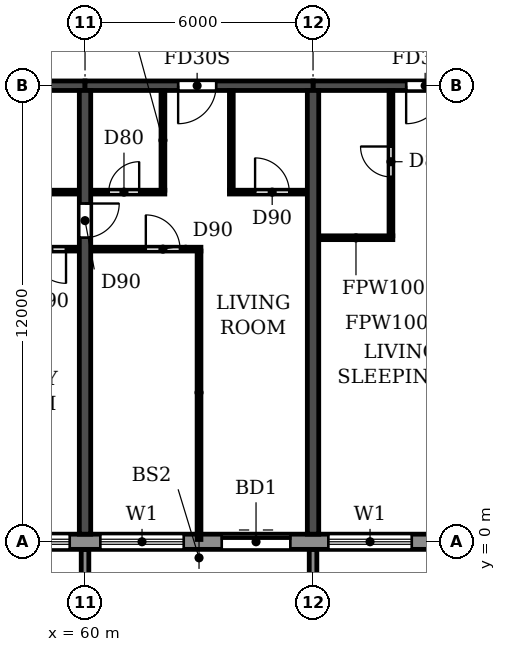
"""IFC4 building model, lengths in metres.
Left out: names, types, materials, properties, quantities, classifications, styles, units other than length and angle.
Written with IfcOpenShell. Run it as: python <this file> out.ifc"""

import sys

from ifc_helpers import new_model, si_unit, direction, frame, frame_2d, origin, place, context, subcontext, project, spatial, polyline, rectangle, outline, extrude, source, transform, mapped, element, fill, save


model = new_model("IFC4")
c1 = context("Model", 3, precision=1e-05, world=origin(), true_north=direction((0.0, 1.0)))
c2 = subcontext(c1, "Body", "Model", "MODEL_VIEW")
j1 = project(units=[si_unit("LENGTHUNIT", "METRE"), si_unit("PLANEANGLEUNIT", "RADIAN")], contexts=[c1])
p1 = place(None, origin())
s1 = spatial("IfcSite", under=j1, at=p1, CompositionType="ELEMENT")
p2 = place(p1, origin())
s2 = spatial("IfcBuilding", under=s1, at=p2, CompositionType="ELEMENT")
p3 = place(p2, frame((0.0, 0.0, 155.4)))
s3 = spatial("IfcBuildingStorey", under=s2, at=p3, CompositionType="ELEMENT", Elevation=155.4)
p4 = place(p3, frame((60.0, 0.2, 0.0), z_axis=(0.0, 0.0, 1.0), x_axis=(0.0, 1.0, 0.0)))
e1 = element("IfcWall", 1, at=p4, inside=s3, PredefinedType="SHEAR", context=c2, shape_type="SweptSolid", body=[
    extrude(rectangle(XDim=11.675, YDim=0.3, at=frame_2d((5.837, 0.0))), origin(), (0.0, 0.0, 1.0), 3.0),
])
p5 = place(p4, frame((7.8, 0.0, 0.0)))
e2 = element("IfcOpeningElement", 2, at=p5, cuts=e1, PredefinedType="OPENING", context=c2, shape_type="SweptSolid", body=[
    extrude(rectangle(XDim=0.9, YDim=2.1, at=frame_2d((0.45, 1.05))), frame((0.0, 0.16, 0.0), z_axis=(0.0, -1.0, 0.0), x_axis=(1.0, 0.0, 0.0)), (0.0, 0.0, 1.0), 0.32),
])
p6 = place(p3, frame((66.0, 0.2, 0.0), z_axis=(0.0, 0.0, 1.0), x_axis=(0.0, 1.0, 0.0)))
e3 = element("IfcWall", 3, at=p6, inside=s3, PredefinedType="SHEAR", context=c2, shape_type="SweptSolid", body=[
    extrude(rectangle(XDim=11.675, YDim=0.3, at=frame_2d((5.837, 0.0))), origin(), (0.0, 0.0, 1.0), 3.0),
])
p7 = place(p3, frame((54.0, 12.0, 0.0), z_axis=(0.0, 0.0, 1.0), x_axis=(1.0, 0.0, 0.0)))
e4 = element("IfcWall", 4, at=p7, inside=s3, PredefinedType="SHEAR", context=c2, shape_type="SweptSolid", body=[
    extrude(rectangle(XDim=6.0, YDim=0.25, at=frame_2d((3.0, 0.0))), origin(), (0.0, 0.0, 1.0), 2.4),
])
p8 = place(p3, frame((60.0, 12.0, 0.0), z_axis=(0.0, 0.0, 1.0), x_axis=(1.0, 0.0, 0.0)))
e5 = element("IfcWall", 5, at=p8, inside=s3, PredefinedType="SHEAR", context=c2, shape_type="SweptSolid", body=[
    extrude(rectangle(XDim=6.0, YDim=0.25, at=frame_2d((3.0, 0.0))), origin(), (0.0, 0.0, 1.0), 2.4),
])
p9 = place(p8, frame((2.45, 0.0, 0.0)))
e6 = element("IfcOpeningElement", 6, at=p9, cuts=e5, PredefinedType="OPENING", context=c2, shape_type="SweptSolid", body=[
    extrude(rectangle(XDim=1.0, YDim=2.1, at=frame_2d((0.5, 1.05))), frame((0.0, 0.135, 0.0), z_axis=(0.0, -1.0, 0.0), x_axis=(1.0, 0.0, 0.0)), (0.0, 0.0, 1.0), 0.27),
])
p10 = place(p3, frame((66.0, 12.0, 0.0), z_axis=(0.0, 0.0, 1.0), x_axis=(1.0, 0.0, 0.0)))
e7 = element("IfcWall", 7, at=p10, inside=s3, PredefinedType="SHEAR", context=c2, shape_type="SweptSolid", body=[
    extrude(rectangle(XDim=6.0, YDim=0.25, at=frame_2d((3.0, 0.0))), origin(), (0.0, 0.0, 1.0), 2.4),
])
p11 = place(p10, frame((2.45, 0.0, 0.0)))
e8 = element("IfcOpeningElement", 8, at=p11, cuts=e7, PredefinedType="OPENING", context=c2, shape_type="SweptSolid", body=[
    extrude(rectangle(XDim=1.0, YDim=2.1, at=frame_2d((0.5, 1.05))), frame((0.0, 0.135, 0.0), z_axis=(0.0, -1.0, 0.0), x_axis=(1.0, 0.0, 0.0)), (0.0, 0.0, 1.0), 0.27),
])
p12 = place(p3, frame((16.683, 0.0, 0.0), z_axis=(0.0, 0.0, 1.0), x_axis=(1.0, 0.0, 0.0)))
e9 = element("IfcWall", 9, at=p12, inside=s3, PredefinedType="STANDARD", context=c2, shape_type="SweptSolid", body=[
    extrude(rectangle(XDim=68.634, YDim=0.4, at=frame_2d((34.317, 0.0))), origin(), (0.0, 0.0, 1.0), 3.0),
])
p13 = place(p12, frame((1.717, 0.0, 0.9)))
e10 = element("IfcOpeningElement", 10, at=p13, cuts=e9, PredefinedType="OPENING", context=c2, shape_type="SweptSolid", body=[
    extrude(rectangle(XDim=2.2, YDim=1.5, at=frame_2d((1.1, 0.75))), frame((0.0, 0.21, 0.0), z_axis=(0.0, -1.0, 0.0), x_axis=(1.0, 0.0, 0.0)), (0.0, 0.0, 1.0), 0.42),
])
p14 = place(p12, frame((4.717, 0.0, 0.9)))
e11 = element("IfcOpeningElement", 11, at=p14, cuts=e9, PredefinedType="OPENING", context=c2, shape_type="SweptSolid", body=[
    extrude(rectangle(XDim=2.2, YDim=1.5, at=frame_2d((1.1, 0.75))), frame((0.0, 0.21, 0.0), z_axis=(0.0, -1.0, 0.0), x_axis=(1.0, 0.0, 0.0)), (0.0, 0.0, 1.0), 0.42),
])
p15 = place(p12, frame((7.917, 0.0, 0.0)))
e12 = element("IfcOpeningElement", 12, at=p15, cuts=e9, PredefinedType="OPENING", context=c2, shape_type="SweptSolid", body=[
    extrude(rectangle(XDim=1.8, YDim=2.4, at=frame_2d((0.9, 1.2))), frame((0.0, 0.21, 0.0), z_axis=(0.0, -1.0, 0.0), x_axis=(1.0, 0.0, 0.0)), (0.0, 0.0, 1.0), 0.42),
])
p16 = place(p12, frame((10.717, 0.0, 0.9)))
e13 = element("IfcOpeningElement", 13, at=p16, cuts=e9, PredefinedType="OPENING", context=c2, shape_type="SweptSolid", body=[
    extrude(rectangle(XDim=2.2, YDim=1.5, at=frame_2d((1.1, 0.75))), frame((0.0, 0.21, 0.0), z_axis=(0.0, -1.0, 0.0), x_axis=(1.0, 0.0, 0.0)), (0.0, 0.0, 1.0), 0.42),
])
p17 = place(p12, frame((13.717, 0.0, 0.9)))
e14 = element("IfcOpeningElement", 14, at=p17, cuts=e9, PredefinedType="OPENING", context=c2, shape_type="SweptSolid", body=[
    extrude(rectangle(XDim=2.2, YDim=1.5, at=frame_2d((1.1, 0.75))), frame((0.0, 0.21, 0.0), z_axis=(0.0, -1.0, 0.0), x_axis=(1.0, 0.0, 0.0)), (0.0, 0.0, 1.0), 0.42),
])
p18 = place(p12, frame((16.717, 0.0, 0.9)))
e15 = element("IfcOpeningElement", 15, at=p18, cuts=e9, PredefinedType="OPENING", context=c2, shape_type="SweptSolid", body=[
    extrude(rectangle(XDim=2.2, YDim=1.5, at=frame_2d((1.1, 0.75))), frame((0.0, 0.21, 0.0), z_axis=(0.0, -1.0, 0.0), x_axis=(1.0, 0.0, 0.0)), (0.0, 0.0, 1.0), 0.42),
])
p19 = place(p12, frame((19.717, 0.0, 0.9)))
e16 = element("IfcOpeningElement", 16, at=p19, cuts=e9, PredefinedType="OPENING", context=c2, shape_type="SweptSolid", body=[
    extrude(rectangle(XDim=2.2, YDim=1.5, at=frame_2d((1.1, 0.75))), frame((0.0, 0.21, 0.0), z_axis=(0.0, -1.0, 0.0), x_axis=(1.0, 0.0, 0.0)), (0.0, 0.0, 1.0), 0.42),
])
p20 = place(p12, frame((22.917, 0.0, 0.0)))
e17 = element("IfcOpeningElement", 17, at=p20, cuts=e9, PredefinedType="OPENING", context=c2, shape_type="SweptSolid", body=[
    extrude(rectangle(XDim=1.8, YDim=2.4, at=frame_2d((0.9, 1.2))), frame((0.0, 0.21, 0.0), z_axis=(0.0, -1.0, 0.0), x_axis=(1.0, 0.0, 0.0)), (0.0, 0.0, 1.0), 0.42),
])
p21 = place(p12, frame((25.717, 0.0, 0.9)))
e18 = element("IfcOpeningElement", 18, at=p21, cuts=e9, PredefinedType="OPENING", context=c2, shape_type="SweptSolid", body=[
    extrude(rectangle(XDim=2.2, YDim=1.5, at=frame_2d((1.1, 0.75))), frame((0.0, 0.21, 0.0), z_axis=(0.0, -1.0, 0.0), x_axis=(1.0, 0.0, 0.0)), (0.0, 0.0, 1.0), 0.42),
])
p22 = place(p12, frame((28.717, 0.0, 0.9)))
e19 = element("IfcOpeningElement", 19, at=p22, cuts=e9, PredefinedType="OPENING", context=c2, shape_type="SweptSolid", body=[
    extrude(rectangle(XDim=2.2, YDim=1.5, at=frame_2d((1.1, 0.75))), frame((0.0, 0.21, 0.0), z_axis=(0.0, -1.0, 0.0), x_axis=(1.0, 0.0, 0.0)), (0.0, 0.0, 1.0), 0.42),
])
p23 = place(p12, frame((31.917, 0.0, 0.0)))
e20 = element("IfcOpeningElement", 20, at=p23, cuts=e9, PredefinedType="OPENING", context=c2, shape_type="SweptSolid", body=[
    extrude(rectangle(XDim=1.8, YDim=2.4, at=frame_2d((0.9, 1.2))), frame((0.0, 0.21, 0.0), z_axis=(0.0, -1.0, 0.0), x_axis=(1.0, 0.0, 0.0)), (0.0, 0.0, 1.0), 0.42),
])
p24 = place(p12, frame((34.717, 0.0, 0.9)))
e21 = element("IfcOpeningElement", 21, at=p24, cuts=e9, PredefinedType="OPENING", context=c2, shape_type="SweptSolid", body=[
    extrude(rectangle(XDim=2.2, YDim=1.5, at=frame_2d((1.1, 0.75))), frame((0.0, 0.21, 0.0), z_axis=(0.0, -1.0, 0.0), x_axis=(1.0, 0.0, 0.0)), (0.0, 0.0, 1.0), 0.42),
])
p25 = place(p12, frame((37.717, 0.0, 0.9)))
e22 = element("IfcOpeningElement", 22, at=p25, cuts=e9, PredefinedType="OPENING", context=c2, shape_type="SweptSolid", body=[
    extrude(rectangle(XDim=2.2, YDim=1.5, at=frame_2d((1.1, 0.75))), frame((0.0, 0.21, 0.0), z_axis=(0.0, -1.0, 0.0), x_axis=(1.0, 0.0, 0.0)), (0.0, 0.0, 1.0), 0.42),
])
p26 = place(p12, frame((40.717, 0.0, 0.9)))
e23 = element("IfcOpeningElement", 23, at=p26, cuts=e9, PredefinedType="OPENING", context=c2, shape_type="SweptSolid", body=[
    extrude(rectangle(XDim=2.2, YDim=1.5, at=frame_2d((1.1, 0.75))), frame((0.0, 0.21, 0.0), z_axis=(0.0, -1.0, 0.0), x_axis=(1.0, 0.0, 0.0)), (0.0, 0.0, 1.0), 0.42),
])
p27 = place(p12, frame((43.717, 0.0, 0.9)))
e24 = element("IfcOpeningElement", 24, at=p27, cuts=e9, PredefinedType="OPENING", context=c2, shape_type="SweptSolid", body=[
    extrude(rectangle(XDim=2.2, YDim=1.5, at=frame_2d((1.1, 0.75))), frame((0.0, 0.21, 0.0), z_axis=(0.0, -1.0, 0.0), x_axis=(1.0, 0.0, 0.0)), (0.0, 0.0, 1.0), 0.42),
])
p28 = place(p12, frame((46.917, 0.0, 0.0)))
e25 = element("IfcOpeningElement", 25, at=p28, cuts=e9, PredefinedType="OPENING", context=c2, shape_type="SweptSolid", body=[
    extrude(rectangle(XDim=1.8, YDim=2.4, at=frame_2d((0.9, 1.2))), frame((0.0, 0.21, 0.0), z_axis=(0.0, -1.0, 0.0), x_axis=(1.0, 0.0, 0.0)), (0.0, 0.0, 1.0), 0.42),
])
p29 = place(p12, frame((49.717, 0.0, 0.9)))
e26 = element("IfcOpeningElement", 26, at=p29, cuts=e9, PredefinedType="OPENING", context=c2, shape_type="SweptSolid", body=[
    extrude(rectangle(XDim=2.2, YDim=1.5, at=frame_2d((1.1, 0.75))), frame((0.0, 0.21, 0.0), z_axis=(0.0, -1.0, 0.0), x_axis=(1.0, 0.0, 0.0)), (0.0, 0.0, 1.0), 0.42),
])
p30 = place(p12, frame((52.717, 0.0, 0.9)))
e27 = element("IfcOpeningElement", 27, at=p30, cuts=e9, PredefinedType="OPENING", context=c2, shape_type="SweptSolid", body=[
    extrude(rectangle(XDim=2.2, YDim=1.5, at=frame_2d((1.1, 0.75))), frame((0.0, 0.21, 0.0), z_axis=(0.0, -1.0, 0.0), x_axis=(1.0, 0.0, 0.0)), (0.0, 0.0, 1.0), 0.42),
])
p31 = place(p12, frame((55.717, 0.0, 0.9)))
e28 = element("IfcOpeningElement", 28, at=p31, cuts=e9, PredefinedType="OPENING", context=c2, shape_type="SweptSolid", body=[
    extrude(rectangle(XDim=2.2, YDim=1.5, at=frame_2d((1.1, 0.75))), frame((0.0, 0.21, 0.0), z_axis=(0.0, -1.0, 0.0), x_axis=(1.0, 0.0, 0.0)), (0.0, 0.0, 1.0), 0.42),
])
p32 = place(p12, frame((58.917, 0.0, 0.0)))
e29 = element("IfcOpeningElement", 29, at=p32, cuts=e9, PredefinedType="OPENING", context=c2, shape_type="SweptSolid", body=[
    extrude(rectangle(XDim=1.8, YDim=2.4, at=frame_2d((0.9, 1.2))), frame((0.0, 0.21, 0.0), z_axis=(0.0, -1.0, 0.0), x_axis=(1.0, 0.0, 0.0)), (0.0, 0.0, 1.0), 0.42),
])
p33 = place(p12, frame((61.717, 0.0, 0.9)))
e30 = element("IfcOpeningElement", 30, at=p33, cuts=e9, PredefinedType="OPENING", context=c2, shape_type="SweptSolid", body=[
    extrude(rectangle(XDim=2.2, YDim=1.5, at=frame_2d((1.1, 0.75))), frame((0.0, 0.21, 0.0), z_axis=(0.0, -1.0, 0.0), x_axis=(1.0, 0.0, 0.0)), (0.0, 0.0, 1.0), 0.42),
])
p34 = place(p12, frame((64.717, 0.0, 0.9)))
e31 = element("IfcOpeningElement", 31, at=p34, cuts=e9, PredefinedType="OPENING", context=c2, shape_type="SweptSolid", body=[
    extrude(rectangle(XDim=2.2, YDim=1.5, at=frame_2d((1.1, 0.75))), frame((0.0, 0.21, 0.0), z_axis=(0.0, -1.0, 0.0), x_axis=(1.0, 0.0, 0.0)), (0.0, 0.0, 1.0), 0.42),
])
m1 = source(origin(), c2, "Body", "SweptSolid", [
    extrude(outline(polyline([(0.0, 0.0), (0.2, 0.0), (0.2, 1.65), (0.0, 1.65), (0.0, 0.0)])), origin(), (0.0, 0.0, 1.0), 3.1),
])
for number, where in (
    (32, (59.9, -1.85, 0.0)),
    (33, (65.9, -1.85, 0.0)),
):
    element("IfcWall", number, at=place(p3, frame(where)), inside=s3, PredefinedType="STANDARD", context=c2, shape_type="MappedRepresentation", body=[
        mapped(m1, transform((0.0, 0.0, 0.0))),
    ])
p35 = place(p3, frame((56.9, 7.7, 0.0), z_axis=(0.0, 0.0, 1.0), x_axis=(1.0, 0.0, 0.0)))
e34 = element("IfcWall", 34, at=p35, inside=s3, PredefinedType="PARTITIONING", context=c2, shape_type="SweptSolid", body=[
    extrude(rectangle(XDim=2.94, YDim=0.1, at=frame_2d((1.47, 0.0))), origin(), (0.0, 0.0, 1.0), 3.0),
])
p36 = place(p35, frame((1.7, 0.0, 0.0)))
e35 = element("IfcOpeningElement", 35, at=p36, cuts=e34, PredefinedType="OPENING", context=c2, shape_type="SweptSolid", body=[
    extrude(rectangle(XDim=0.9, YDim=2.1, at=frame_2d((0.45, 1.05))), frame((0.0, 0.06, 0.0), z_axis=(0.0, -1.0, 0.0), x_axis=(1.0, 0.0, 0.0)), (0.0, 0.0, 1.0), 0.12),
])
p37 = place(p3, frame((60.16, 7.7, 0.0), z_axis=(0.0, 0.0, 1.0), x_axis=(1.0, 0.0, 0.0)))
e36 = element("IfcWall", 36, at=p37, inside=s3, PredefinedType="PARTITIONING", context=c2, shape_type="SweptSolid", body=[
    extrude(rectangle(XDim=2.89, YDim=0.1, at=frame_2d((1.445, 0.0))), origin(), (0.0, 0.0, 1.0), 3.0),
])
p38 = place(p37, frame((1.44, 0.0, 0.0)))
e37 = element("IfcOpeningElement", 37, at=p38, cuts=e36, PredefinedType="OPENING", context=c2, shape_type="SweptSolid", body=[
    extrude(rectangle(XDim=0.9, YDim=2.1, at=frame_2d((0.45, 1.05))), frame((0.0, 0.06, 0.0), z_axis=(0.0, -1.0, 0.0), x_axis=(1.0, 0.0, 0.0)), (0.0, 0.0, 1.0), 0.12),
])
p39 = place(p3, frame((66.16, 8.0, 0.0), z_axis=(0.0, 0.0, 1.0), x_axis=(1.0, 0.0, 0.0)))
e38 = element("IfcWall", 38, at=p39, inside=s3, PredefinedType="PARTITIONING", context=c2, shape_type="SweptSolid", body=[
    extrude(rectangle(XDim=1.94, YDim=0.1, at=frame_2d((0.97, 0.0))), origin(), (0.0, 0.0, 1.0), 3.0),
])
p40 = place(p3, frame((57.1, 9.2, 0.0), z_axis=(0.0, 0.0, 1.0), x_axis=(1.0, 0.0, 0.0)))
e39 = element("IfcWall", 39, at=p40, inside=s3, PredefinedType="PARTITIONING", context=c2, shape_type="SweptSolid", body=[
    extrude(rectangle(XDim=2.74, YDim=0.1, at=frame_2d((1.37, 0.0))), origin(), (0.0, 0.0, 1.0), 3.0),
])
p41 = place(p40, frame((1.0, 0.0, 0.0)))
e40 = element("IfcOpeningElement", 40, at=p41, cuts=e39, PredefinedType="OPENING", context=c2, shape_type="SweptSolid", body=[
    extrude(rectangle(XDim=0.8, YDim=2.1, at=frame_2d((0.4, 1.05))), frame((0.0, 0.06, 0.0), z_axis=(0.0, -1.0, 0.0), x_axis=(1.0, 0.0, 0.0)), (0.0, 0.0, 1.0), 0.12),
])
p42 = place(p3, frame((60.16, 9.2, 0.0), z_axis=(0.0, 0.0, 1.0), x_axis=(1.0, 0.0, 0.0)))
e41 = element("IfcWall", 41, at=p42, inside=s3, PredefinedType="PARTITIONING", context=c2, shape_type="SweptSolid", body=[
    extrude(rectangle(XDim=1.94, YDim=0.1, at=frame_2d((0.97, 0.0))), origin(), (0.0, 0.0, 1.0), 3.0),
])
p43 = place(p42, frame((0.465, 0.0, 0.0)))
e42 = element("IfcOpeningElement", 42, at=p43, cuts=e41, PredefinedType="OPENING", context=c2, shape_type="SweptSolid", body=[
    extrude(rectangle(XDim=0.8, YDim=2.1, at=frame_2d((0.4, 1.05))), frame((0.0, 0.06, 0.0), z_axis=(0.0, -1.0, 0.0), x_axis=(1.0, 0.0, 0.0)), (0.0, 0.0, 1.0), 0.12),
])
p44 = place(p3, frame((63.8, 9.2, 0.0), z_axis=(0.0, 0.0, 1.0), x_axis=(1.0, 0.0, 0.0)))
e43 = element("IfcWall", 43, at=p44, inside=s3, PredefinedType="PARTITIONING", context=c2, shape_type="SweptSolid", body=[
    extrude(rectangle(XDim=2.04, YDim=0.1, at=frame_2d((1.02, 0.0))), origin(), (0.0, 0.0, 1.0), 3.0),
])
p45 = place(p44, frame((0.675, 0.0, 0.0)))
e44 = element("IfcOpeningElement", 44, at=p45, cuts=e43, PredefinedType="OPENING", context=c2, shape_type="SweptSolid", body=[
    extrude(rectangle(XDim=0.9, YDim=2.1, at=frame_2d((0.45, 1.05))), frame((0.0, 0.06, 0.0), z_axis=(0.0, -1.0, 0.0), x_axis=(1.0, 0.0, 0.0)), (0.0, 0.0, 1.0), 0.12),
])
p46 = place(p3, frame((62.05, 9.25, 0.0), z_axis=(0.0, 0.0, 1.0), x_axis=(0.0, 1.0, 0.0)))
e45 = element("IfcWall", 45, at=p46, inside=s3, PredefinedType="PARTITIONING", context=c2, shape_type="SweptSolid", body=[
    extrude(rectangle(XDim=2.615, YDim=0.1, at=frame_2d((1.308, 0.0))), origin(), (0.0, 0.0, 1.0), 3.0),
])
p47 = place(p3, frame((63.0, 0.06, 0.0), z_axis=(0.0, 0.0, 1.0), x_axis=(0.0, 1.0, 0.0)))
e46 = element("IfcWall", 46, at=p47, inside=s3, PredefinedType="PARTITIONING", context=c2, shape_type="SweptSolid", body=[
    extrude(rectangle(XDim=7.59, YDim=0.1, at=frame_2d((3.795, 0.0))), origin(), (0.0, 0.0, 1.0), 3.0),
])
p48 = place(p3, frame((63.85, 9.25, 0.0), z_axis=(0.0, 0.0, 1.0), x_axis=(0.0, 1.0, 0.0)))
e47 = element("IfcWall", 47, at=p48, inside=s3, PredefinedType="PARTITIONING", context=c2, shape_type="SweptSolid", body=[
    extrude(rectangle(XDim=2.615, YDim=0.1, at=frame_2d((1.308, 0.0))), origin(), (0.0, 0.0, 1.0), 3.0),
])
p49 = place(p3, frame((68.05, 8.05, 0.0), z_axis=(0.0, 0.0, 1.0), x_axis=(0.0, 1.0, 0.0)))
e48 = element("IfcWall", 48, at=p49, inside=s3, PredefinedType="PARTITIONING", context=c2, shape_type="SweptSolid", body=[
    extrude(rectangle(XDim=3.815, YDim=0.1, at=frame_2d((1.907, 0.0))), origin(), (0.0, 0.0, 1.0), 3.0),
])
p50 = place(p49, frame((1.55, 0.0, 0.0)))
e49 = element("IfcOpeningElement", 49, at=p50, cuts=e48, PredefinedType="OPENING", context=c2, shape_type="SweptSolid", body=[
    extrude(rectangle(XDim=0.8, YDim=2.1, at=frame_2d((0.4, 1.05))), frame((0.0, 0.06, 0.0), z_axis=(0.0, -1.0, 0.0), x_axis=(1.0, 0.0, 0.0)), (0.0, 0.0, 1.0), 0.12),
])
p51 = place(p26, origin())
e50 = element("IfcWindow", 50, at=p51, inside=s3, PartitioningType="DOUBLE_PANEL_HORIZONTAL", PredefinedType="WINDOW", context=c2, shape_type="SweptSolid", body=[
    extrude(rectangle(XDim=2.2, YDim=1.5, at=frame_2d((1.1, 0.75))), frame((0.0, 0.03, 0.0), z_axis=(0.0, -1.0, 0.0), x_axis=(1.0, 0.0, 0.0)), (0.0, 0.0, 1.0), 0.06),
])
fill(e23, e50)
p52 = place(p27, origin())
e51 = element("IfcWindow", 51, at=p52, inside=s3, PartitioningType="DOUBLE_PANEL_HORIZONTAL", PredefinedType="WINDOW", context=c2, shape_type="SweptSolid", body=[
    extrude(rectangle(XDim=2.2, YDim=1.5, at=frame_2d((1.1, 0.75))), frame((0.0, 0.03, 0.0), z_axis=(0.0, -1.0, 0.0), x_axis=(1.0, 0.0, 0.0)), (0.0, 0.0, 1.0), 0.06),
])
fill(e24, e51)
p53 = place(p28, origin())
e52 = element("IfcDoor", 52, at=p53, inside=s3, OperationType="DOUBLE_DOOR_SLIDING", PredefinedType="DOOR", context=c2, shape_type="SweptSolid", body=[
    extrude(rectangle(XDim=1.8, YDim=2.4, at=frame_2d((0.9, 1.2))), frame((0.0, 0.025, 0.0), z_axis=(0.0, -1.0, 0.0), x_axis=(1.0, 0.0, 0.0)), (0.0, 0.0, 1.0), 0.05),
])
fill(e25, e52)
p54 = place(p29, origin())
e53 = element("IfcWindow", 53, at=p54, inside=s3, PartitioningType="DOUBLE_PANEL_HORIZONTAL", PredefinedType="WINDOW", context=c2, shape_type="SweptSolid", body=[
    extrude(rectangle(XDim=2.2, YDim=1.5, at=frame_2d((1.1, 0.75))), frame((0.0, 0.03, 0.0), z_axis=(0.0, -1.0, 0.0), x_axis=(1.0, 0.0, 0.0)), (0.0, 0.0, 1.0), 0.06),
])
fill(e26, e53)
p55 = place(p36, frame((0.9, 0.0, 0.0), z_axis=(0.0, 0.0, 1.0), x_axis=(-1.0, 0.0, 0.0)))
e54 = element("IfcDoor", 54, at=p55, inside=s3, OperationType="SINGLE_SWING_LEFT", PredefinedType="DOOR", context=c2, shape_type="SweptSolid", body=[
    extrude(rectangle(XDim=0.9, YDim=2.1, at=frame_2d((0.45, 1.05))), frame((0.0, 0.025, 0.0), z_axis=(0.0, -1.0, 0.0), x_axis=(1.0, 0.0, 0.0)), (0.0, 0.0, 1.0), 0.05),
])
fill(e35, e54)
p56 = place(p5, frame((0.9, 0.0, 0.0), z_axis=(0.0, 0.0, 1.0), x_axis=(-1.0, 0.0, 0.0)))
e55 = element("IfcDoor", 55, at=p56, inside=s3, OperationType="SINGLE_SWING_LEFT", PredefinedType="DOOR", context=c2, shape_type="SweptSolid", body=[
    extrude(rectangle(XDim=0.9, YDim=2.1, at=frame_2d((0.45, 1.05))), frame((0.0, 0.025, 0.0), z_axis=(0.0, -1.0, 0.0), x_axis=(1.0, 0.0, 0.0)), (0.0, 0.0, 1.0), 0.05),
])
fill(e2, e55)
p57 = place(p43, origin())
e56 = element("IfcDoor", 56, at=p57, inside=s3, OperationType="SINGLE_SWING_RIGHT", PredefinedType="DOOR", context=c2, shape_type="SweptSolid", body=[
    extrude(rectangle(XDim=0.8, YDim=2.1, at=frame_2d((0.4, 1.05))), frame((0.0, 0.025, 0.0), z_axis=(0.0, -1.0, 0.0), x_axis=(1.0, 0.0, 0.0)), (0.0, 0.0, 1.0), 0.05),
])
fill(e42, e56)
p58 = place(p38, origin())
e57 = element("IfcDoor", 57, at=p58, inside=s3, OperationType="SINGLE_SWING_LEFT", PredefinedType="DOOR", context=c2, shape_type="SweptSolid", body=[
    extrude(rectangle(XDim=0.9, YDim=2.1, at=frame_2d((0.45, 1.05))), frame((0.0, 0.025, 0.0), z_axis=(0.0, -1.0, 0.0), x_axis=(1.0, 0.0, 0.0)), (0.0, 0.0, 1.0), 0.05),
])
fill(e37, e57)
p59 = place(p9, frame((1.0, 0.0, 0.0), z_axis=(0.0, 0.0, 1.0), x_axis=(-1.0, 0.0, 0.0)))
e58 = element("IfcDoor", 58, at=p59, inside=s3, OperationType="SINGLE_SWING_RIGHT", PredefinedType="DOOR", context=c2, shape_type="SweptSolid", body=[
    extrude(rectangle(XDim=1.0, YDim=2.1, at=frame_2d((0.5, 1.05))), frame((0.0, 0.025, 0.0), z_axis=(0.0, -1.0, 0.0), x_axis=(1.0, 0.0, 0.0)), (0.0, 0.0, 1.0), 0.05),
])
fill(e6, e58)
p60 = place(p45, origin())
e59 = element("IfcDoor", 59, at=p60, inside=s3, OperationType="SINGLE_SWING_LEFT", PredefinedType="DOOR", context=c2, shape_type="SweptSolid", body=[
    extrude(rectangle(XDim=0.9, YDim=2.1, at=frame_2d((0.45, 1.05))), frame((0.0, 0.025, 0.0), z_axis=(0.0, -1.0, 0.0), x_axis=(1.0, 0.0, 0.0)), (0.0, 0.0, 1.0), 0.05),
])
fill(e44, e59)
p61 = place(p50, origin())
e60 = element("IfcDoor", 60, at=p61, inside=s3, OperationType="SINGLE_SWING_RIGHT", PredefinedType="DOOR", context=c2, shape_type="SweptSolid", body=[
    extrude(rectangle(XDim=0.8, YDim=2.1, at=frame_2d((0.4, 1.05))), frame((0.0, 0.025, 0.0), z_axis=(0.0, -1.0, 0.0), x_axis=(1.0, 0.0, 0.0)), (0.0, 0.0, 1.0), 0.05),
])
fill(e49, e60)
p62 = place(p11, frame((1.0, 0.0, 0.0), z_axis=(0.0, 0.0, 1.0), x_axis=(-1.0, 0.0, 0.0)))
e61 = element("IfcDoor", 61, at=p62, inside=s3, OperationType="SINGLE_SWING_RIGHT", PredefinedType="DOOR", context=c2, shape_type="SweptSolid", body=[
    extrude(rectangle(XDim=1.0, YDim=2.1, at=frame_2d((0.5, 1.05))), frame((0.0, 0.025, 0.0), z_axis=(0.0, -1.0, 0.0), x_axis=(1.0, 0.0, 0.0)), (0.0, 0.0, 1.0), 0.05),
])
fill(e8, e61)
save(model, sys.argv[1])
